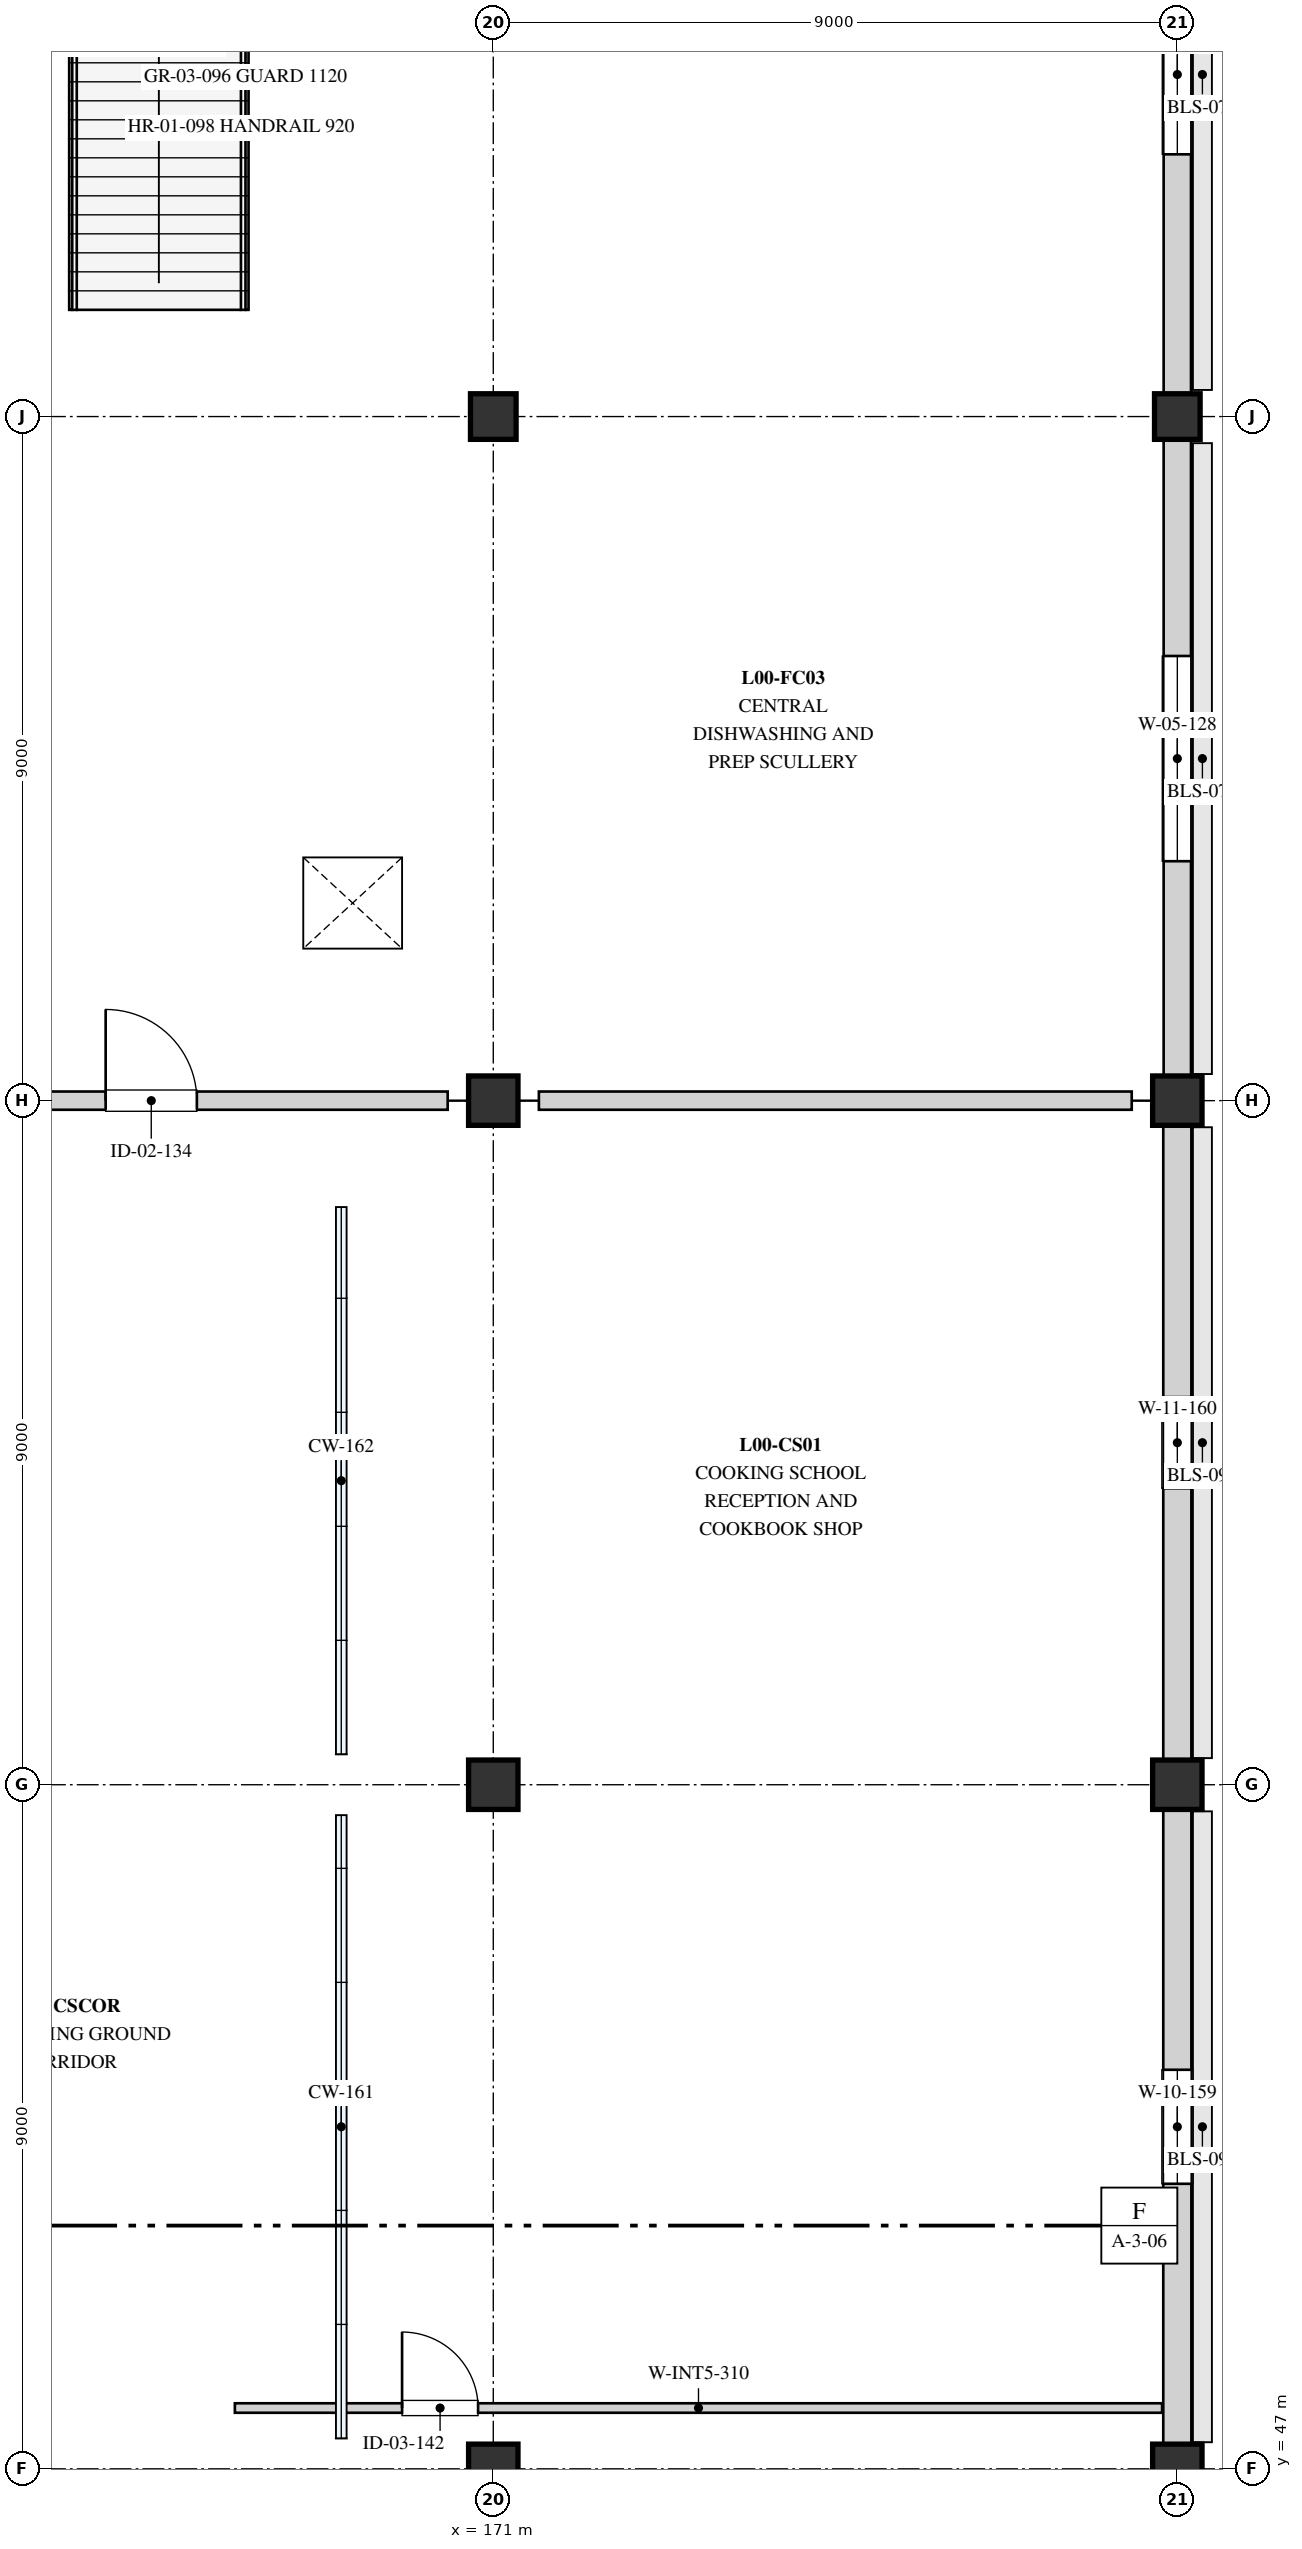
"""IFC4 building model, lengths in metres.
Left out: names, types, materials, properties, quantities, classifications, styles, units other than length and angle.
Written with IfcOpenShell. Run it as: python <this file> out.ifc"""

import sys

from ifc_helpers import new_model, si_unit, direction, frame, frame_2d, origin, origin_2d, place, context, subcontext, project, spatial, rectangle, extrude, element, fill, save


model = new_model("IFC4")
c1 = context("Model", 3, precision=1e-05, world=origin(), true_north=direction((0.0, 1.0)))
c2 = subcontext(c1, "Body", "Model", "MODEL_VIEW")
j1 = project(units=[si_unit("LENGTHUNIT", "METRE"), si_unit("PLANEANGLEUNIT", "RADIAN")], contexts=[c1])
p1 = place(None, origin())
s1 = spatial("IfcSite", under=j1, at=p1, CompositionType="ELEMENT")
p2 = place(p1, origin())
s2 = spatial("IfcBuilding", under=s1, at=p2, CompositionType="ELEMENT")
p3 = place(p2, origin())
s3 = spatial("IfcBuildingStorey", under=s2, at=p3, CompositionType="ELEMENT", Elevation=0.0)
for number, where, z_axis, x_axis in (
    (1, (171.0, 47.0, 0.0), (0.0, 0.0, 1.0), (1.0, 0.0, 0.0)),
    (2, (171.0, 56.0, 0.0), (0.0, 0.0, 1.0), (1.0, 0.0, 0.0)),
    (3, (171.0, 65.0, 0.0), (0.0, 0.0, 1.0), (1.0, 0.0, 0.0)),
):
    element("IfcColumn", number, at=place(p3, frame(where, z_axis=z_axis, x_axis=x_axis)), inside=s3, PredefinedType="COLUMN", context=c2, shape_type="SweptSolid", body=[
        extrude(rectangle(XDim=0.65, YDim=0.65, at=origin_2d()), origin(), (0.0, 0.0, 1.0), 4.5),
    ])
p4 = place(p3, frame((171.0, 74.0, 0.0), z_axis=(0.0, 0.0, 1.0), x_axis=(1.0, 0.0, 0.0)))
e4 = element("IfcColumn", 4, at=p4, inside=s3, PredefinedType="COLUMN", context=c2, shape_type="SweptSolid", body=[
    extrude(rectangle(XDim=0.6, YDim=0.6, at=origin_2d()), origin(), (0.0, 0.0, 1.0), 4.5),
])
for number, where, z_axis, x_axis in (
    (5, (180.0, 47.0, 0.0), (0.0, 0.0, 1.0), (1.0, 0.0, 0.0)),
    (6, (180.0, 56.0, 0.0), (0.0, 0.0, 1.0), (1.0, 0.0, 0.0)),
    (7, (180.0, 65.0, 0.0), (0.0, 0.0, 1.0), (1.0, 0.0, 0.0)),
):
    element("IfcColumn", number, at=place(p3, frame(where, z_axis=z_axis, x_axis=x_axis)), inside=s3, PredefinedType="COLUMN", context=c2, shape_type="SweptSolid", body=[
        extrude(rectangle(XDim=0.65, YDim=0.65, at=origin_2d()), origin(), (0.0, 0.0, 1.0), 4.5),
    ])
p5 = place(p3, frame((180.0, 74.0, 0.0), z_axis=(0.0, 0.0, 1.0), x_axis=(1.0, 0.0, 0.0)))
e8 = element("IfcColumn", 8, at=p5, inside=s3, PredefinedType="COLUMN", context=c2, shape_type="SweptSolid", body=[
    extrude(rectangle(XDim=0.6, YDim=0.6, at=origin_2d()), origin(), (0.0, 0.0, 1.0), 4.5),
])
p6 = place(p3, frame((180.0, 65.0, 0.0), z_axis=(0.0, 0.0, 1.0), x_axis=(0.0, 1.0, 0.0)))
e9 = element("IfcWall", 9, at=p6, inside=s3, PredefinedType="STANDARD", context=c2, shape_type="SweptSolid", body=[
    extrude(rectangle(XDim=9.0, YDim=0.36, at=frame_2d((4.5, 0.0))), origin(), (0.0, 0.0, 1.0), 3.36),
])
p7 = place(p6, frame((3.15, 0.0, 0.8)))
e10 = element("IfcOpeningElement", 10, at=p7, cuts=e9, PredefinedType="OPENING", context=c2, shape_type="SweptSolid", body=[
    extrude(rectangle(XDim=2.7, YDim=2.4, at=frame_2d((1.35, 1.2))), frame((0.0, 0.19, 0.0), z_axis=(0.0, -1.0, 0.0), x_axis=(1.0, 0.0, 0.0)), (0.0, 0.0, 1.0), 0.38),
])
p8 = place(p3, frame((180.0, 74.0, 0.0), z_axis=(0.0, 0.0, 1.0), x_axis=(0.0, 1.0, 0.0)))
e11 = element("IfcWall", 11, at=p8, inside=s3, PredefinedType="STANDARD", context=c2, shape_type="SweptSolid", body=[
    extrude(rectangle(XDim=9.0, YDim=0.36, at=frame_2d((4.5, 0.0))), origin(), (0.0, 0.0, 1.0), 3.36),
])
p9 = place(p8, frame((3.45, 0.0, 0.8)))
e12 = element("IfcOpeningElement", 12, at=p9, cuts=e11, PredefinedType="OPENING", context=c2, shape_type="SweptSolid", body=[
    extrude(rectangle(XDim=2.1, YDim=2.2, at=frame_2d((1.05, 1.1))), frame((0.0, 0.19, 0.0), z_axis=(0.0, -1.0, 0.0), x_axis=(1.0, 0.0, 0.0)), (0.0, 0.0, 1.0), 0.38),
])
p10 = place(p3, frame((180.0, 47.0, 0.0), z_axis=(0.0, 0.0, 1.0), x_axis=(0.0, 1.0, 0.0)))
e13 = element("IfcWall", 13, at=p10, inside=s3, PredefinedType="STANDARD", context=c2, shape_type="SweptSolid", body=[
    extrude(rectangle(XDim=9.0, YDim=0.37, at=frame_2d((4.5, 0.0))), origin(), (0.0, 0.0, 1.0), 3.38),
])
p11 = place(p10, frame((3.75, 0.0, 0.9)))
e14 = element("IfcOpeningElement", 14, at=p11, cuts=e13, PredefinedType="OPENING", context=c2, shape_type="SweptSolid", body=[
    extrude(rectangle(XDim=1.5, YDim=1.8, at=frame_2d((0.75, 0.9))), frame((0.0, 0.195, 0.0), z_axis=(0.0, -1.0, 0.0), x_axis=(1.0, 0.0, 0.0)), (0.0, 0.0, 1.0), 0.39),
])
p12 = place(p3, frame((180.0, 56.0, 0.0), z_axis=(0.0, 0.0, 1.0), x_axis=(0.0, 1.0, 0.0)))
e15 = element("IfcWall", 15, at=p12, inside=s3, PredefinedType="STANDARD", context=c2, shape_type="SweptSolid", body=[
    extrude(rectangle(XDim=9.0, YDim=0.37, at=frame_2d((4.5, 0.0))), origin(), (0.0, 0.0, 1.0), 3.36),
])
p13 = place(p12, frame((3.9, 0.0, 0.9)))
e16 = element("IfcOpeningElement", 16, at=p13, cuts=e15, PredefinedType="OPENING", context=c2, shape_type="SweptSolid", body=[
    extrude(rectangle(XDim=1.2, YDim=1.8, at=frame_2d((0.6, 0.9))), frame((0.0, 0.195, 0.0), z_axis=(0.0, -1.0, 0.0), x_axis=(1.0, 0.0, 0.0)), (0.0, 0.0, 1.0), 0.39),
])
p14 = place(p3, frame((162.6, 65.0, 0.0), z_axis=(0.0, 0.0, 1.0), x_axis=(1.0, 0.0, 0.0)))
e17 = element("IfcWall", 17, at=p14, inside=s3, PredefinedType="SOLIDWALL", context=c2, shape_type="SweptSolid", body=[
    extrude(rectangle(XDim=7.8, YDim=0.24, at=frame_2d((3.9, 0.0))), origin(), (0.0, 0.0, 1.0), 3.2),
])
p15 = place(p14, frame((3.3, 0.0, 0.0)))
e18 = element("IfcOpeningElement", 18, at=p15, cuts=e17, PredefinedType="OPENING", context=c2, shape_type="SweptSolid", body=[
    extrude(rectangle(XDim=1.2, YDim=2.15, at=frame_2d((0.6, 1.075))), frame((0.0, 0.13, 0.0), z_axis=(0.0, -1.0, 0.0), x_axis=(1.0, 0.0, 0.0)), (0.0, 0.0, 1.0), 0.26),
])
p16 = place(p3, frame((171.6, 65.0, 0.0), z_axis=(0.0, 0.0, 1.0), x_axis=(1.0, 0.0, 0.0)))
e19 = element("IfcWall", 19, at=p16, inside=s3, PredefinedType="SOLIDWALL", context=c2, shape_type="SweptSolid", body=[
    extrude(rectangle(XDim=7.8, YDim=0.24, at=frame_2d((3.9, 0.0))), origin(), (0.0, 0.0, 1.0), 3.2),
])
p17 = place(p3, frame((167.6, 47.8, 0.0), z_axis=(0.0, 0.0, 1.0), x_axis=(1.0, 0.0, 0.0)))
e20 = element("IfcWall", 20, at=p17, inside=s3, PredefinedType="PARTITIONING", context=c2, shape_type="SweptSolid", body=[
    extrude(rectangle(XDim=12.2, YDim=0.125, at=frame_2d((6.1, 0.0))), origin(), (0.0, 0.0, 1.0), 3.2),
])
p18 = place(p17, frame((2.2, 0.0, 0.0)))
e21 = element("IfcOpeningElement", 21, at=p18, cuts=e20, PredefinedType="OPENING", context=c2, shape_type="SweptSolid", body=[
    extrude(rectangle(XDim=1.0, YDim=2.1, at=frame_2d((0.5, 1.05))), frame((0.0, 0.073, 0.0), z_axis=(0.0, -1.0, 0.0), x_axis=(1.0, 0.0, 0.0)), (0.0, 0.0, 1.0), 0.145),
])
p19 = place(p7, origin())
e22 = element("IfcWindow", 22, at=p19, inside=s3, PartitioningType="SINGLE_PANEL", PredefinedType="WINDOW", context=c2, shape_type="SweptSolid", body=[
    extrude(rectangle(XDim=2.7, YDim=2.4, at=frame_2d((1.35, 1.2))), frame((0.0, 0.03, 0.0), z_axis=(0.0, -1.0, 0.0), x_axis=(1.0, 0.0, 0.0)), (0.0, 0.0, 1.0), 0.06),
])
fill(e10, e22)
p20 = place(p9, origin())
e23 = element("IfcWindow", 23, at=p20, inside=s3, PartitioningType="SINGLE_PANEL", PredefinedType="WINDOW", context=c2, shape_type="SweptSolid", body=[
    extrude(rectangle(XDim=2.1, YDim=2.2, at=frame_2d((1.05, 1.1))), frame((0.0, 0.03, 0.0), z_axis=(0.0, -1.0, 0.0), x_axis=(1.0, 0.0, 0.0)), (0.0, 0.0, 1.0), 0.06),
])
fill(e12, e23)
p21 = place(p11, origin())
e24 = element("IfcWindow", 24, at=p21, inside=s3, PartitioningType="SINGLE_PANEL", PredefinedType="WINDOW", context=c2, shape_type="SweptSolid", body=[
    extrude(rectangle(XDim=1.5, YDim=1.8, at=frame_2d((0.75, 0.9))), frame((0.0, 0.03, 0.0), z_axis=(0.0, -1.0, 0.0), x_axis=(1.0, 0.0, 0.0)), (0.0, 0.0, 1.0), 0.06),
])
fill(e14, e24)
p22 = place(p13, origin())
e25 = element("IfcWindow", 25, at=p22, inside=s3, PartitioningType="SINGLE_PANEL", PredefinedType="WINDOW", context=c2, shape_type="SweptSolid", body=[
    extrude(rectangle(XDim=1.2, YDim=1.8, at=frame_2d((0.6, 0.9))), frame((0.0, 0.03, 0.0), z_axis=(0.0, -1.0, 0.0), x_axis=(1.0, 0.0, 0.0)), (0.0, 0.0, 1.0), 0.06),
])
fill(e16, e25)
p23 = place(p15, origin())
e26 = element("IfcDoor", 26, at=p23, inside=s3, OperationType="SINGLE_SWING_LEFT", PredefinedType="DOOR", context=c2, shape_type="SweptSolid", body=[
    extrude(rectangle(XDim=1.2, YDim=2.15, at=frame_2d((0.6, 1.075))), frame((0.0, 0.025, 0.0), z_axis=(0.0, -1.0, 0.0), x_axis=(1.0, 0.0, 0.0)), (0.0, 0.0, 1.0), 0.05),
])
fill(e18, e26)
p24 = place(p18, origin())
e27 = element("IfcDoor", 27, at=p24, inside=s3, OperationType="SINGLE_SWING_LEFT", PredefinedType="DOOR", context=c2, shape_type="SweptSolid", body=[
    extrude(rectangle(XDim=1.0, YDim=2.1, at=frame_2d((0.5, 1.05))), frame((0.0, 0.025, 0.0), z_axis=(0.0, -1.0, 0.0), x_axis=(1.0, 0.0, 0.0)), (0.0, 0.0, 1.0), 0.05),
])
fill(e21, e27)
save(model, sys.argv[1])
